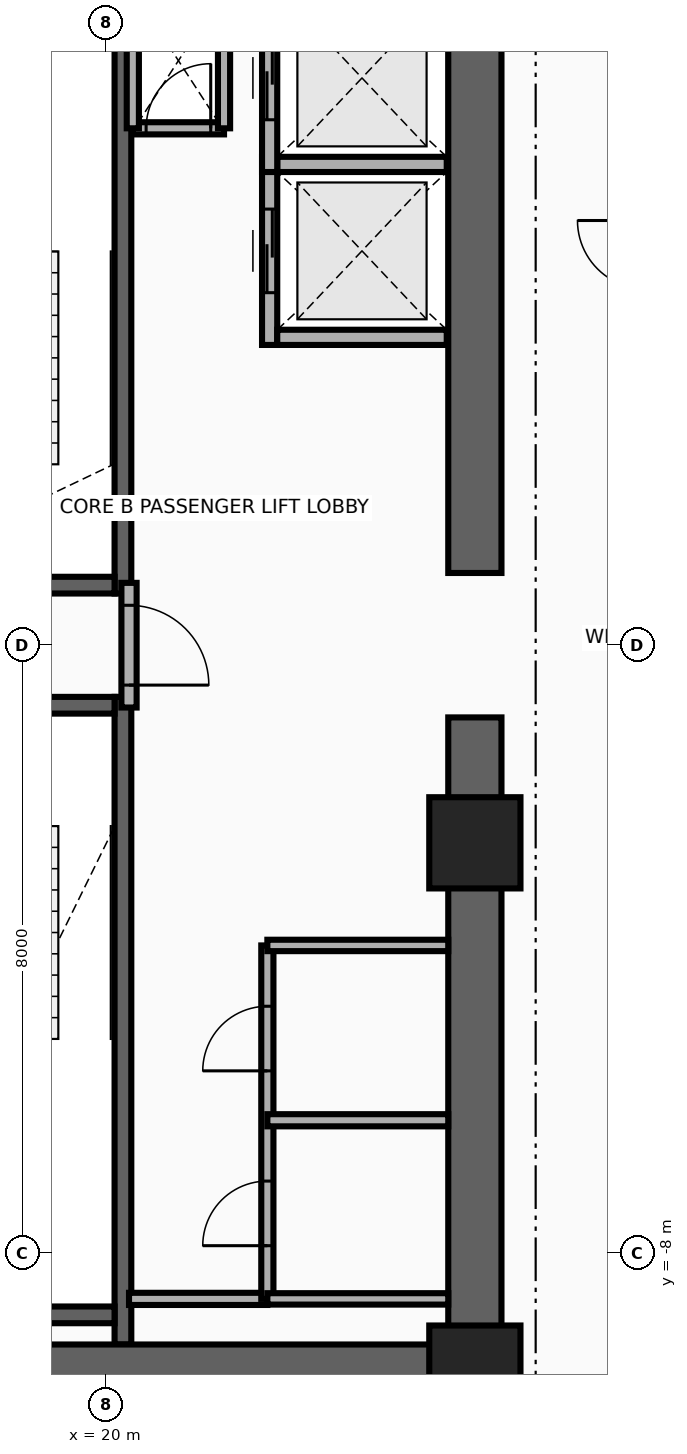
"""IFC4 building model, lengths in metres.
Left out: names, types, materials, properties, quantities, classifications, styles, units other than length and angle.
Written with IfcOpenShell. Run it as: python <this file> out.ifc"""

import sys

from ifc_helpers import new_model, si_unit, direction, frame, frame_2d, origin, origin_2d, place, context, subcontext, project, spatial, rectangle, extrude, source, transform, mapped, element, fill, save


model = new_model("IFC4")
c1 = context("Model", 3, precision=1e-05, world=origin(), true_north=direction((0.0, 1.0)))
c2 = subcontext(c1, "Body", "Model", "MODEL_VIEW")
j1 = project(units=[si_unit("LENGTHUNIT", "METRE"), si_unit("PLANEANGLEUNIT", "RADIAN")], contexts=[c1])
p1 = place(None, origin())
s1 = spatial("IfcSite", under=j1, at=p1, CompositionType="ELEMENT")
p2 = place(p1, origin())
s2 = spatial("IfcBuilding", under=s1, at=p2, CompositionType="ELEMENT")
p3 = place(p2, frame((0.0, 0.0, 146.4)))
s3 = spatial("IfcBuildingStorey", under=s2, at=p3, CompositionType="ELEMENT", Elevation=146.4)
p4 = place(p3, frame((20.22, 0.68, 0.0), z_axis=(0.0, 0.0, 1.0), x_axis=(0.0, 1.0, 0.0)))
e1 = element("IfcWall", 1, at=p4, inside=s3, PredefinedType="SHEAR", context=c2, shape_type="SweptSolid", body=[
    extrude(rectangle(XDim=8.52, YDim=0.22, at=frame_2d((4.26, 0.0))), origin(), (0.0, 0.0, 1.0), 3.46),
])
p5 = place(p3, frame((17.0, 0.79, 0.0), z_axis=(0.0, 0.0, 1.0), x_axis=(1.0, 0.0, 0.0)))
e2 = element("IfcWall", 2, at=p5, inside=s3, PredefinedType="SHEAR", context=c2, shape_type="SweptSolid", body=[
    extrude(rectangle(XDim=3.11, YDim=0.22, at=frame_2d((1.555, 0.0))), origin(), (0.0, 0.0, 1.0), 3.46),
])
p6 = place(p5, frame((0.95, 0.0, 0.0)))
e3 = element("IfcOpeningElement", 3, at=p6, cuts=e2, PredefinedType="OPENING", context=c2, shape_type="SweptSolid", body=[
    extrude(rectangle(XDim=1.1, YDim=2.15, at=frame_2d((0.55, 1.075))), frame((0.0, 0.125, 0.0), z_axis=(0.0, -1.0, 0.0), x_axis=(1.0, 0.0, 0.0)), (0.0, 0.0, 1.0), 0.25),
])
p7 = place(p3, frame((20.22, -9.2, 0.0), z_axis=(0.0, 0.0, 1.0), x_axis=(0.0, 1.0, 0.0)))
e4 = element("IfcWall", 4, at=p7, inside=s3, PredefinedType="SHEAR", context=c2, shape_type="SweptSolid", body=[
    extrude(rectangle(XDim=8.52, YDim=0.22, at=frame_2d((4.26, 0.0))), origin(), (0.0, 0.0, 1.0), 3.46),
])
p8 = place(p3, frame((17.0, -8.81, 0.0), z_axis=(0.0, 0.0, 1.0), x_axis=(1.0, 0.0, 0.0)))
e5 = element("IfcWall", 5, at=p8, inside=s3, PredefinedType="SHEAR", context=c2, shape_type="SweptSolid", body=[
    extrude(rectangle(XDim=3.11, YDim=0.22, at=frame_2d((1.555, 0.0))), origin(), (0.0, 0.0, 1.0), 3.46),
])
p9 = place(p3, frame((17.0, -0.79, 0.0), z_axis=(0.0, 0.0, 1.0), x_axis=(1.0, 0.0, 0.0)))
e6 = element("IfcWall", 6, at=p9, inside=s3, PredefinedType="SHEAR", context=c2, shape_type="SweptSolid", body=[
    extrude(rectangle(XDim=3.11, YDim=0.22, at=frame_2d((1.555, 0.0))), origin(), (0.0, 0.0, 1.0), 3.46),
])
p10 = place(p9, frame((0.95, 0.0, 0.0)))
e7 = element("IfcOpeningElement", 7, at=p10, cuts=e6, PredefinedType="OPENING", context=c2, shape_type="SweptSolid", body=[
    extrude(rectangle(XDim=1.1, YDim=2.15, at=frame_2d((0.55, 1.075))), frame((0.0, 0.125, 0.0), z_axis=(0.0, -1.0, 0.0), x_axis=(1.0, 0.0, 0.0)), (0.0, 0.0, 1.0), 0.25),
])
for number, where, z_axis, x_axis in (
    (8, (24.85, -9.9, 0.0), (0.0, 0.0, 1.0), (0.0, 1.0, 0.0)),
    (9, (24.85, 0.95, 0.0), (0.0, 0.0, 1.0), (0.0, 1.0, 0.0)),
):
    element("IfcWall", number, at=place(p3, frame(where, z_axis=z_axis, x_axis=x_axis)), inside=s3, PredefinedType="SHEAR", context=c2, shape_type="SweptSolid", body=[
        extrude(rectangle(XDim=8.95, YDim=0.7, at=frame_2d((4.475, 0.0))), origin(), (0.0, 0.0, 1.0), 3.46),
    ])
p11 = place(p3, frame((15.85, -9.55, 0.0), z_axis=(0.0, 0.0, 1.0), x_axis=(1.0, 0.0, 0.0)))
e10 = element("IfcWall", 10, at=p11, inside=s3, PredefinedType="SHEAR", context=c2, shape_type="SweptSolid", body=[
    extrude(rectangle(XDim=9.0, YDim=0.7, at=frame_2d((4.5, 0.0))), origin(), (0.0, 0.0, 1.0), 3.46),
])
m1 = source(origin(), c2, "Body", "SweptSolid", [
    extrude(rectangle(XDim=1.2, YDim=1.2, at=origin_2d()), origin(), (0.0, 0.0, 1.0), 3.7),
])
for number, where, z_axis, x_axis in (
    (11, (24.85, -9.55, 0.0), (0.0, 0.0, 1.0), (1.0, 0.0, 0.0)),
    (12, (24.85, -2.6, 0.0), (0.0, 0.0, 1.0), (1.0, 0.0, 0.0)),
):
    element("IfcColumn", number, at=place(p3, frame(where, z_axis=z_axis, x_axis=x_axis)), inside=s3, PredefinedType="COLUMN", context=c2, shape_type="MappedRepresentation", body=[
        mapped(m1, transform((0.0, 0.0, 0.0), x_axis=(1.0, 0.0, 0.0), y_axis=(0.0, 1.0, 0.0), z_axis=(0.0, 0.0, 1.0), scale=1.0)),
    ])
p12 = place(p3, frame((22.15, 3.95, 0.0), z_axis=(0.0, 0.0, 1.0), x_axis=(0.0, 1.0, 0.0)))
e13 = element("IfcWall", 13, at=p12, inside=s3, PredefinedType="MOVABLE", context=c2, shape_type="SweptSolid", body=[
    extrude(rectangle(XDim=2.475, YDim=0.2, at=frame_2d((1.238, 0.0))), origin(), (0.0, 0.0, 1.0), 3.46),
])
p13 = place(p12, frame((0.688, 0.0, 0.0)))
e14 = element("IfcOpeningElement", 14, at=p13, cuts=e13, PredefinedType="OPENING", context=c2, shape_type="SweptSolid", body=[
    extrude(rectangle(XDim=1.1, YDim=2.1, at=frame_2d((0.55, 1.05))), frame((0.0, 0.115, 0.0), z_axis=(0.0, -1.0, 0.0), x_axis=(1.0, 0.0, 0.0)), (0.0, 0.0, 1.0), 0.23),
])
for number, where, z_axis, x_axis in (
    (15, (22.25, 4.05, 0.0), (0.0, 0.0, 1.0), (1.0, 0.0, 0.0)),
    (16, (22.25, 6.325, 0.0), (0.0, 0.0, 1.0), (1.0, 0.0, 0.0)),
):
    element("IfcWall", number, at=place(p3, frame(where, z_axis=z_axis, x_axis=x_axis)), inside=s3, PredefinedType="MOVABLE", context=c2, shape_type="SweptSolid", body=[
        extrude(rectangle(XDim=2.23, YDim=0.2, at=frame_2d((1.115, 0.0))), origin(), (0.0, 0.0, 1.0), 2.245),
    ])
p14 = place(p3, frame((22.15, 6.225, 0.0), z_axis=(0.0, 0.0, 1.0), x_axis=(0.0, 1.0, 0.0)))
e17 = element("IfcWall", 17, at=p14, inside=s3, PredefinedType="MOVABLE", context=c2, shape_type="SweptSolid", body=[
    extrude(rectangle(XDim=2.475, YDim=0.2, at=frame_2d((1.237, 0.0))), origin(), (0.0, 0.0, 1.0), 3.46),
])
p15 = place(p14, frame((0.688, 0.0, 0.0)))
e18 = element("IfcOpeningElement", 18, at=p15, cuts=e17, PredefinedType="OPENING", context=c2, shape_type="SweptSolid", body=[
    extrude(rectangle(XDim=1.1, YDim=2.1, at=frame_2d((0.55, 1.05))), frame((0.0, 0.115, 0.0), z_axis=(0.0, -1.0, 0.0), x_axis=(1.0, 0.0, 0.0)), (0.0, 0.0, 1.0), 0.23),
])
p16 = place(p3, frame((20.3, -0.82, 0.0), z_axis=(0.0, 0.0, 1.0), x_axis=(0.0, 1.0, 0.0)))
e19 = element("IfcWall", 19, at=p16, inside=s3, PredefinedType="PARTITIONING", context=c2, shape_type="SweptSolid", body=[
    extrude(rectangle(XDim=1.64, YDim=0.2, at=frame_2d((0.82, 0.0))), origin(), (0.0, 0.0, 1.0), 3.46),
])
p17 = place(p16, frame((0.295, 0.0, 0.0)))
e20 = element("IfcOpeningElement", 20, at=p17, cuts=e19, PredefinedType="OPENING", context=c2, shape_type="SweptSolid", body=[
    extrude(rectangle(XDim=1.05, YDim=2.15, at=frame_2d((0.525, 1.075))), frame((0.0, 0.115, 0.0), z_axis=(0.0, -1.0, 0.0), x_axis=(1.0, 0.0, 0.0)), (0.0, 0.0, 1.0), 0.23),
])
p18 = place(p3, frame((20.35, 6.8, 0.0), z_axis=(0.0, 0.0, 1.0), x_axis=(1.0, 0.0, 0.0)))
e21 = element("IfcWall", 21, at=p18, inside=s3, PredefinedType="PARTITIONING", context=c2, shape_type="SweptSolid", body=[
    extrude(rectangle(XDim=1.2, YDim=0.16, at=frame_2d((0.6, 0.0))), origin(), (0.0, 0.0, 1.0), 3.46),
])
p19 = place(p18, frame((0.175, 0.0, 0.0)))
e22 = element("IfcOpeningElement", 22, at=p19, cuts=e21, PredefinedType="OPENING", context=c2, shape_type="SweptSolid", body=[
    extrude(rectangle(XDim=0.85, YDim=2.05, at=frame_2d((0.425, 1.025))), frame((0.0, 0.095, 0.0), z_axis=(0.0, -1.0, 0.0), x_axis=(1.0, 0.0, 0.0)), (0.0, 0.0, 1.0), 0.19),
])
for number, where, z_axis, x_axis in (
    (23, (21.55, 6.8, 0.0), (0.0, 0.0, 1.0), (0.0, 1.0, 0.0)),
    (24, (20.35, 6.8, 0.0), (0.0, 0.0, 1.0), (0.0, 1.0, 0.0)),
):
    element("IfcWall", number, at=place(p3, frame(where, z_axis=z_axis, x_axis=x_axis)), inside=s3, PredefinedType="PARTITIONING", context=c2, shape_type="SweptSolid", body=[
        extrude(rectangle(XDim=1.8, YDim=0.16, at=frame_2d((0.9, 0.0))), origin(), (0.0, 0.0, 1.0), 3.46),
    ])
p20 = place(p3, frame((20.3, -8.6, 0.0), z_axis=(0.0, 0.0, 1.0), x_axis=(1.0, 0.0, 0.0)))
e25 = element("IfcWall", 25, at=p20, inside=s3, PredefinedType="PARTITIONING", context=c2, shape_type="SweptSolid", body=[
    extrude(rectangle(XDim=1.82, YDim=0.16, at=frame_2d((0.91, 0.0))), origin(), (0.0, 0.0, 1.0), 3.46),
])
p21 = place(p3, frame((22.12, -8.6, 0.0), z_axis=(0.0, 0.0, 1.0), x_axis=(0.0, 1.0, 0.0)))
e26 = element("IfcWall", 26, at=p21, inside=s3, PredefinedType="PARTITIONING", context=c2, shape_type="SweptSolid", body=[
    extrude(rectangle(XDim=4.65, YDim=0.16, at=frame_2d((2.325, 0.0))), origin(), (0.0, 0.0, 1.0), 3.46),
])
p22 = place(p21, frame((0.7, 0.0, 0.0)))
e27 = element("IfcOpeningElement", 27, at=p22, cuts=e26, PredefinedType="OPENING", context=c2, shape_type="SweptSolid", body=[
    extrude(rectangle(XDim=0.85, YDim=2.05, at=frame_2d((0.425, 1.025))), frame((0.0, 0.095, 0.0), z_axis=(0.0, -1.0, 0.0), x_axis=(1.0, 0.0, 0.0)), (0.0, 0.0, 1.0), 0.19),
])
p23 = place(p21, frame((3.0, 0.0, 0.0)))
e28 = element("IfcOpeningElement", 28, at=p23, cuts=e26, PredefinedType="OPENING", context=c2, shape_type="SweptSolid", body=[
    extrude(rectangle(XDim=0.85, YDim=2.05, at=frame_2d((0.425, 1.025))), frame((0.0, 0.095, 0.0), z_axis=(0.0, -1.0, 0.0), x_axis=(1.0, 0.0, 0.0)), (0.0, 0.0, 1.0), 0.19),
])
for number, where, z_axis, x_axis in (
    (29, (22.12, -3.95, 0.0), (0.0, 0.0, 1.0), (1.0, 0.0, 0.0)),
    (30, (22.12, -8.6, 0.0), (0.0, 0.0, 1.0), (1.0, 0.0, 0.0)),
):
    element("IfcWall", number, at=place(p3, frame(where, z_axis=z_axis, x_axis=x_axis)), inside=s3, PredefinedType="PARTITIONING", context=c2, shape_type="SweptSolid", body=[
        extrude(rectangle(XDim=2.38, YDim=0.15, at=frame_2d((1.19, 0.0))), origin(), (0.0, 0.0, 1.0), 3.46),
    ])
p24 = place(p3, frame((22.12, -6.25, 0.0), z_axis=(0.0, 0.0, 1.0), x_axis=(1.0, 0.0, 0.0)))
e31 = element("IfcWall", 31, at=p24, inside=s3, PredefinedType="PARTITIONING", context=c2, shape_type="SweptSolid", body=[
    extrude(rectangle(XDim=2.38, YDim=0.16, at=frame_2d((1.19, 0.0))), origin(), (0.0, 0.0, 1.0), 3.46),
])
p25 = place(p13, origin())
e32 = element("IfcDoor", 32, at=p25, inside=s3, OperationType="DOUBLE_DOOR_SLIDING", PredefinedType="DOOR", context=c2, shape_type="SweptSolid", body=[
    extrude(rectangle(XDim=1.1, YDim=2.1, at=frame_2d((0.55, 1.05))), frame((0.0, 0.025, 0.0), z_axis=(0.0, -1.0, 0.0), x_axis=(1.0, 0.0, 0.0)), (0.0, 0.0, 1.0), 0.05),
])
fill(e14, e32)
p26 = place(p15, origin())
e33 = element("IfcDoor", 33, at=p26, inside=s3, OperationType="DOUBLE_DOOR_SLIDING", PredefinedType="DOOR", context=c2, shape_type="SweptSolid", body=[
    extrude(rectangle(XDim=1.1, YDim=2.1, at=frame_2d((0.55, 1.05))), frame((0.0, 0.025, 0.0), z_axis=(0.0, -1.0, 0.0), x_axis=(1.0, 0.0, 0.0)), (0.0, 0.0, 1.0), 0.05),
])
fill(e18, e33)
p27 = place(p17, frame((1.05, 0.0, 0.0), z_axis=(0.0, 0.0, 1.0), x_axis=(-1.0, 0.0, 0.0)))
e34 = element("IfcDoor", 34, at=p27, inside=s3, OperationType="SINGLE_SWING_LEFT", PredefinedType="DOOR", context=c2, shape_type="SweptSolid", body=[
    extrude(rectangle(XDim=1.05, YDim=2.15, at=frame_2d((0.525, 1.075))), frame((0.0, 0.025, 0.0), z_axis=(0.0, -1.0, 0.0), x_axis=(1.0, 0.0, 0.0)), (0.0, 0.0, 1.0), 0.05),
])
fill(e20, e34)
p28 = place(p19, origin())
e35 = element("IfcDoor", 35, at=p28, inside=s3, OperationType="SINGLE_SWING_RIGHT", PredefinedType="DOOR", context=c2, shape_type="SweptSolid", body=[
    extrude(rectangle(XDim=0.85, YDim=2.05, at=frame_2d((0.425, 1.025))), frame((0.0, 0.025, 0.0), z_axis=(0.0, -1.0, 0.0), x_axis=(1.0, 0.0, 0.0)), (0.0, 0.0, 1.0), 0.05),
])
fill(e22, e35)
p29 = place(p22, origin())
e36 = element("IfcDoor", 36, at=p29, inside=s3, OperationType="SINGLE_SWING_LEFT", PredefinedType="DOOR", context=c2, shape_type="SweptSolid", body=[
    extrude(rectangle(XDim=0.85, YDim=2.05, at=frame_2d((0.425, 1.025))), frame((0.0, 0.025, 0.0), z_axis=(0.0, -1.0, 0.0), x_axis=(1.0, 0.0, 0.0)), (0.0, 0.0, 1.0), 0.05),
])
fill(e27, e36)
p30 = place(p23, origin())
e37 = element("IfcDoor", 37, at=p30, inside=s3, OperationType="SINGLE_SWING_RIGHT", PredefinedType="DOOR", context=c2, shape_type="SweptSolid", body=[
    extrude(rectangle(XDim=0.85, YDim=2.05, at=frame_2d((0.425, 1.025))), frame((0.0, 0.025, 0.0), z_axis=(0.0, -1.0, 0.0), x_axis=(1.0, 0.0, 0.0)), (0.0, 0.0, 1.0), 0.05),
])
fill(e28, e37)
save(model, sys.argv[1])
